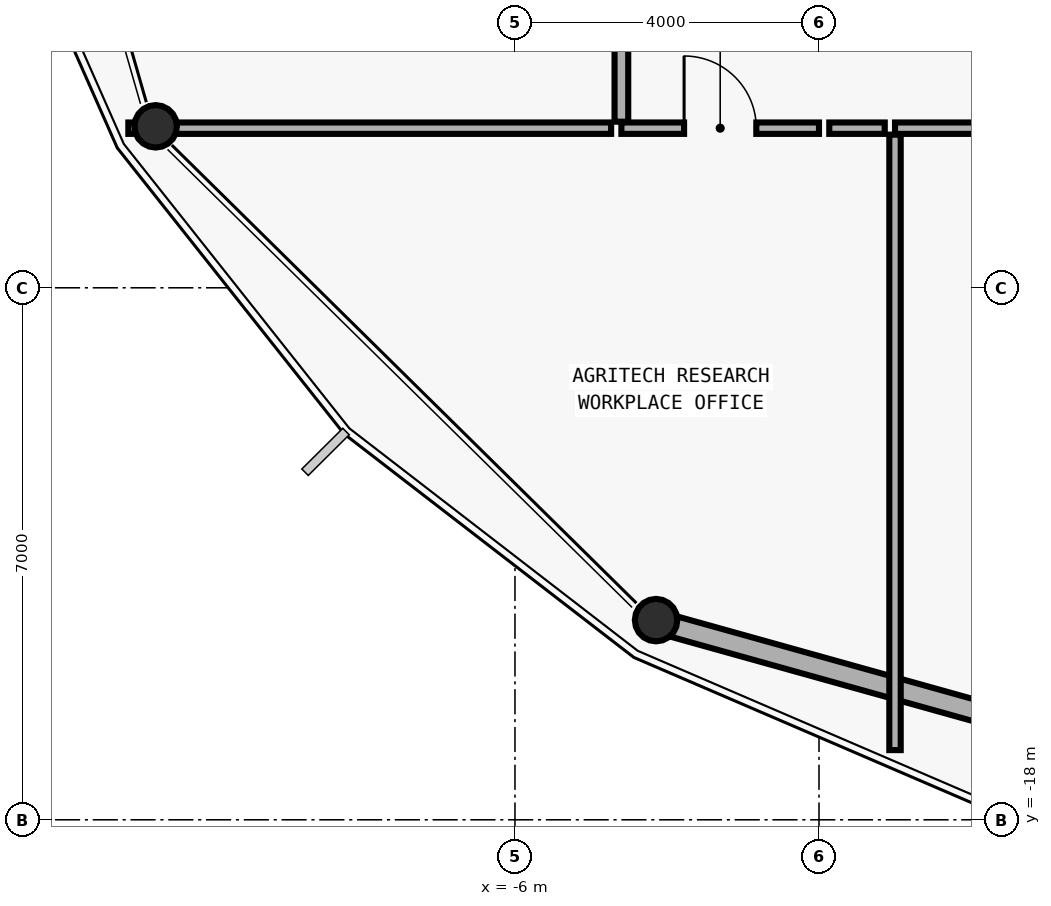
"""IFC4 building model, lengths in metres.
Left out: names, types, materials, properties, quantities, classifications, styles, units other than length and angle.
Written with IfcOpenShell. Run it as: python <this file> out.ifc"""

import sys

from ifc_helpers import new_model, si_unit, direction, frame, frame_2d, origin, origin_2d, place, context, subcontext, project, spatial, rectangle, hollow_circle, extrude, element, fill, save


model = new_model("IFC4")
c1 = context("Model", 3, precision=1e-05, world=origin(), true_north=direction((0.0, 1.0)))
c2 = subcontext(c1, "Body", "Model", "MODEL_VIEW")
j1 = project(units=[si_unit("LENGTHUNIT", "METRE"), si_unit("PLANEANGLEUNIT", "RADIAN")], contexts=[c1])
p1 = place(None, origin())
s1 = spatial("IfcSite", under=j1, at=p1, CompositionType="ELEMENT")
p2 = place(p1, origin())
s2 = spatial("IfcBuilding", under=s1, at=p2, CompositionType="ELEMENT")
p3 = place(p2, frame((0.0, 0.0, 267.0)))
s3 = spatial("IfcBuildingStorey", under=s2, at=p3, CompositionType="ELEMENT", Elevation=267.0)
p4 = place(p3, frame((-10.757, -8.884, 0.0), z_axis=(0.016251167856, 0.004779755252, 0.999856516448), x_axis=(-0.282166323992, 0.959365501571, 0.0)))
e1 = element("IfcColumn", 1, at=p4, inside=s3, PredefinedType="COLUMN", context=c2, shape_type="SweptSolid", body=[
    extrude(hollow_circle(Radius=0.28, WallThickness=0.02, at=origin_2d()), origin(), (0.0, 0.0, 1.0), 3.575),
])
p5 = place(p3, frame((-4.16, -15.387, 0.0), z_axis=(0.00935528271, 0.008194408213, 0.999922662189), x_axis=(-0.658893247603, 0.75223645768, 0.0)))
e2 = element("IfcColumn", 2, at=p5, inside=s3, PredefinedType="COLUMN", context=c2, shape_type="SweptSolid", body=[
    extrude(hollow_circle(Radius=0.28, WallThickness=0.02, at=origin_2d()), origin(), (0.0, 0.0, 1.0), 3.575),
])
p6 = place(p3, frame((4.624, -17.84, 0.0), z_axis=(0.0, 0.0, 1.0), x_axis=(-0.963175454127, 0.268873659119, 0.0)))
e3 = element("IfcWall", 3, at=p6, inside=s3, PredefinedType="SOLIDWALL", context=c2, shape_type="SweptSolid", body=[
    extrude(rectangle(XDim=8.886, YDim=0.28, at=frame_2d((4.443, 0.0))), origin(), (0.0, 0.0, 1.0), 2.97),
])
p7 = place(p3, frame((-4.6, -8.9, 0.0), z_axis=(0.0, 0.0, 1.0), x_axis=(1.0, 0.0, 0.0)))
e4 = element("IfcWall", 4, at=p7, inside=s3, PredefinedType="PARTITIONING", context=c2, shape_type="SweptSolid", body=[
    extrude(rectangle(XDim=2.6, YDim=0.15, at=frame_2d((1.3, 0.0))), origin(), (0.0, 0.0, 1.0), 3.36),
])
p8 = place(p7, frame((0.825, 0.0, 0.0)))
e5 = element("IfcOpeningElement", 5, at=p8, cuts=e4, PredefinedType="OPENING", context=c2, shape_type="SweptSolid", body=[
    extrude(rectangle(XDim=0.95, YDim=2.1, at=frame_2d((0.475, 1.05))), frame((0.0, 0.085, 0.0), z_axis=(0.0, -1.0, 0.0), x_axis=(1.0, 0.0, 0.0)), (0.0, 0.0, 1.0), 0.17),
])
p9 = place(p3, frame((-1.0, -8.9, 0.0), z_axis=(0.0, 0.0, 1.0), x_axis=(1.0, 0.0, 0.0)))
e6 = element("IfcWall", 6, at=p9, inside=s3, PredefinedType="PARTITIONING", context=c2, shape_type="SweptSolid", body=[
    extrude(rectangle(XDim=8.5, YDim=0.15, at=frame_2d((4.25, 0.0))), origin(), (0.0, 0.0, 1.0), 3.36),
])
p10 = place(p9, frame((3.775, 0.0, 0.0)))
e7 = element("IfcOpeningElement", 7, at=p10, cuts=e6, PredefinedType="OPENING", context=c2, shape_type="SweptSolid", body=[
    extrude(rectangle(XDim=0.95, YDim=2.1, at=frame_2d((0.475, 1.05))), frame((0.0, 0.085, 0.0), z_axis=(0.0, -1.0, 0.0), x_axis=(1.0, 0.0, 0.0)), (0.0, 0.0, 1.0), 0.17),
])
p11 = place(p3, frame((-1.865, -8.9, 0.0), z_axis=(0.0, 0.0, 1.0), x_axis=(1.0, 0.0, 0.0)))
e8 = element("IfcWall", 8, at=p11, inside=s3, PredefinedType="PARTITIONING", context=c2, shape_type="SweptSolid", body=[
    extrude(rectangle(XDim=0.73, YDim=0.15, at=frame_2d((0.365, 0.0))), origin(), (0.0, 0.0, 1.0), 3.36),
])
p12 = place(p3, frame((-1.0, -8.985, 0.0), z_axis=(0.0, 0.0, 1.0), x_axis=(0.0, -1.0, 0.0)))
e9 = element("IfcWall", 9, at=p12, inside=s3, PredefinedType="PARTITIONING", context=c2, shape_type="SweptSolid", body=[
    extrude(rectangle(XDim=8.098, YDim=0.15, at=frame_2d((4.049, 0.0))), origin(), (0.0, 0.0, 1.0), 3.36),
])
p13 = place(p3, frame((-11.087, -8.9, 0.0), z_axis=(0.0, 0.0, 1.0), x_axis=(1.0, 0.0, 0.0)))
e10 = element("IfcWall", 10, at=p13, inside=s3, PredefinedType="PARTITIONING", context=c2, shape_type="SweptSolid", body=[
    extrude(rectangle(XDim=6.352, YDim=0.15, at=frame_2d((3.176, 0.0))), origin(), (0.0, 0.0, 1.0), 2.892),
])
p14 = place(p3, frame((-4.6, -6.75, 0.0), z_axis=(0.0, 0.0, 1.0), x_axis=(0.0, -1.0, 0.0)))
e11 = element("IfcWall", 11, at=p14, inside=s3, PredefinedType="PLUMBINGWALL", context=c2, shape_type="SweptSolid", body=[
    extrude(rectangle(XDim=2.065, YDim=0.18, at=frame_2d((1.032, 0.0))), origin(), (0.0, 0.0, 1.0), 3.36),
])
p15 = place(p8, origin())
e12 = element("IfcDoor", 12, at=p15, inside=s3, OperationType="SINGLE_SWING_LEFT", PredefinedType="DOOR", context=c2, shape_type="SweptSolid", body=[
    extrude(rectangle(XDim=0.95, YDim=2.1, at=frame_2d((0.475, 1.05))), frame((0.0, 0.025, 0.0), z_axis=(0.0, -1.0, 0.0), x_axis=(1.0, 0.0, 0.0)), (0.0, 0.0, 1.0), 0.05),
])
fill(e5, e12)
save(model, sys.argv[1])
